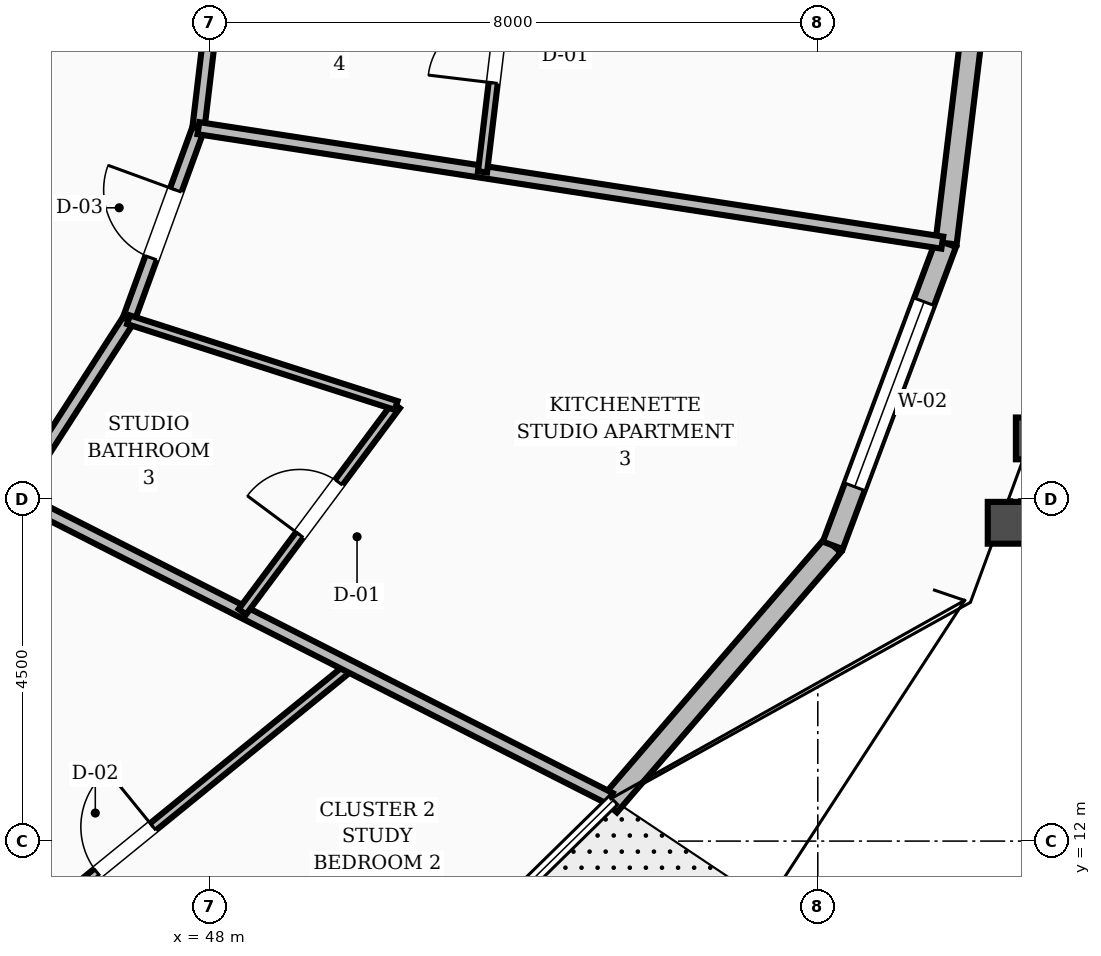
"""IFC4 building model, lengths in metres.
Left out: names, types, materials, properties, quantities, classifications, styles, units other than length and angle.
Written with IfcOpenShell. Run it as: python <this file> out.ifc"""

import sys

from ifc_helpers import new_model, si_unit, direction, frame, frame_2d, origin, place, context, subcontext, project, spatial, rectangle, extrude, element, fill, save


model = new_model("IFC4")
c1 = context("Model", 3, precision=1e-05, world=origin(), true_north=direction((0.0, 1.0)))
c2 = subcontext(c1, "Body", "Model", "MODEL_VIEW")
j1 = project(units=[si_unit("LENGTHUNIT", "METRE"), si_unit("PLANEANGLEUNIT", "RADIAN")], contexts=[c1])
p1 = place(None, origin())
s1 = spatial("IfcSite", under=j1, at=p1, CompositionType="ELEMENT")
p2 = place(p1, origin())
s2 = spatial("IfcBuilding", under=s1, at=p2, CompositionType="ELEMENT")
p3 = place(p2, frame((0.0, 0.0, 44.8)))
s3 = spatial("IfcBuildingStorey", under=s2, at=p3, CompositionType="ELEMENT", Elevation=44.8)
p4 = place(p3, frame((53.251, 12.469, 0.0), z_axis=(0.0, 0.0, 1.0), x_axis=(0.652392900896, 0.757880929211, 0.0)))
e1 = element("IfcWall", 1, at=p4, inside=s3, PredefinedType="STANDARD", context=c2, shape_type="SweptSolid", body=[
    extrude(rectangle(XDim=4.515, YDim=0.28, at=frame_2d((2.258, 0.0))), origin(), (0.0, 0.0, 1.0), 2.65),
])
p5 = place(p3, frame((56.197, 15.891, 0.0), z_axis=(0.0, 0.0, 1.0), x_axis=(0.351066723894, 0.936350444745, 0.0)))
e2 = element("IfcWall", 2, at=p5, inside=s3, PredefinedType="STANDARD", context=c2, shape_type="SweptSolid", body=[
    extrude(rectangle(XDim=4.246, YDim=0.28, at=frame_2d((2.123, 0.0))), origin(), (0.0, 0.0, 1.0), 2.65),
])
p6 = place(p5, frame((0.823, 0.0, 0.8)))
e3 = element("IfcOpeningElement", 3, at=p6, cuts=e2, PredefinedType="OPENING", context=c2, shape_type="SweptSolid", body=[
    extrude(rectangle(XDim=2.6, YDim=1.65, at=frame_2d((1.3, 0.825))), frame((0.0, 0.15, 0.0), z_axis=(0.0, -1.0, 0.0), x_axis=(1.0, 0.0, 0.0)), (0.0, 0.0, 1.0), 0.3),
])
p7 = place(p3, frame((57.688, 19.866, 0.0), z_axis=(0.0, 0.0, 1.0), x_axis=(0.120881081027, 0.992666995648, 0.0)))
e4 = element("IfcWall", 4, at=p7, inside=s3, PredefinedType="STANDARD", context=c2, shape_type="SweptSolid", body=[
    extrude(rectangle(XDim=4.165, YDim=0.28, at=frame_2d((2.082, 0.0))), origin(), (0.0, 0.0, 1.0), 2.65),
])
p8 = place(p3, frame((45.438, 16.537, 0.0), z_axis=(0.0, 0.0, 1.0), x_axis=(0.540891657444, 0.841092274907, 0.0)))
e5 = element("IfcWall", 5, at=p8, inside=s3, PredefinedType="SOLIDWALL", context=c2, shape_type="SweptSolid", body=[
    extrude(rectangle(XDim=2.761, YDim=0.16, at=frame_2d((1.38, 0.0))), origin(), (0.0, 0.0, 1.0), 2.61),
])
p9 = place(p3, frame((46.932, 18.859, 0.0), z_axis=(0.0, 0.0, 1.0), x_axis=(0.342882618672, 0.939378257047, 0.0)))
e6 = element("IfcWall", 6, at=p9, inside=s3, PredefinedType="SOLIDWALL", context=c2, shape_type="SweptSolid", body=[
    extrude(rectangle(XDim=2.683, YDim=0.16, at=frame_2d((1.341, 0.0))), origin(), (0.0, 0.0, 1.0), 2.61),
])
p10 = place(p9, frame((0.866, 0.0, 0.0)))
e7 = element("IfcOpeningElement", 7, at=p10, cuts=e6, PredefinedType="OPENING", context=c2, shape_type="SweptSolid", body=[
    extrude(rectangle(XDim=0.95, YDim=2.1, at=frame_2d((0.475, 1.05))), frame((0.0, 0.09, 0.0), z_axis=(0.0, -1.0, 0.0), x_axis=(1.0, 0.0, 0.0)), (0.0, 0.0, 1.0), 0.18),
])
p11 = place(p3, frame((47.852, 21.379, 0.0), z_axis=(0.0, 0.0, 1.0), x_axis=(0.117667763342, 0.993053018459, 0.0)))
e8 = element("IfcWall", 8, at=p11, inside=s3, PredefinedType="SOLIDWALL", context=c2, shape_type="SweptSolid", body=[
    extrude(rectangle(XDim=2.639, YDim=0.16, at=frame_2d((1.32, 0.0))), origin(), (0.0, 0.0, 1.0), 2.61),
])
p12 = place(p3, frame((43.925, 9.479, 0.0), z_axis=(0.0, 0.0, 1.0), x_axis=(0.775688329038, 0.631116166957, 0.0)))
e9 = element("IfcWall", 9, at=p12, inside=s3, PredefinedType="PARTITIONING", context=c2, shape_type="SweptSolid", body=[
    extrude(rectangle(XDim=7.635, YDim=0.12, at=frame_2d((3.817, 0.0))), origin(), (0.0, 0.0, 1.0), 2.61),
])
p13 = place(p12, frame((3.342, 0.0, 0.0)))
e10 = element("IfcOpeningElement", 10, at=p13, cuts=e9, PredefinedType="OPENING", context=c2, shape_type="SweptSolid", body=[
    extrude(rectangle(XDim=0.95, YDim=2.1, at=frame_2d((0.475, 1.05))), frame((0.0, 0.07, 0.0), z_axis=(0.0, -1.0, 0.0), x_axis=(1.0, 0.0, 0.0)), (0.0, 0.0, 1.0), 0.14),
])
p14 = place(p3, frame((45.438, 16.537, 0.0), z_axis=(0.0, 0.0, 1.0), x_axis=(0.891601143044, -0.452821600327, 0.0)))
e11 = element("IfcWall", 11, at=p14, inside=s3, PredefinedType="SOLIDWALL", context=c2, shape_type="SweptSolid", body=[
    extrude(rectangle(XDim=8.78, YDim=0.16, at=frame_2d((4.39, 0.0))), origin(), (0.0, 0.0, 1.0), 2.61),
])
p15 = place(p3, frame((48.43, 15.017, 0.0), z_axis=(0.0, 0.0, 1.0), x_axis=(0.597596813452, 0.801796762623, 0.0)))
e12 = element("IfcWall", 12, at=p15, inside=s3, PredefinedType="PARTITIONING", context=c2, shape_type="SweptSolid", body=[
    extrude(rectangle(XDim=3.385, YDim=0.12, at=frame_2d((1.692, 0.0))), origin(), (0.0, 0.0, 1.0), 2.61),
])
p16 = place(p15, frame((1.262, 0.0, 0.0)))
e13 = element("IfcOpeningElement", 13, at=p16, cuts=e12, PredefinedType="OPENING", context=c2, shape_type="SweptSolid", body=[
    extrude(rectangle(XDim=0.86, YDim=2.1, at=frame_2d((0.43, 1.05))), frame((0.0, 0.07, 0.0), z_axis=(0.0, -1.0, 0.0), x_axis=(1.0, 0.0, 0.0)), (0.0, 0.0, 1.0), 0.14),
])
p17 = place(p3, frame((46.932, 18.859, 0.0), z_axis=(0.0, 0.0, 1.0), x_axis=(0.952329028564, -0.3050728132, 0.0)))
e14 = element("IfcWall", 14, at=p17, inside=s3, PredefinedType="PARTITIONING", context=c2, shape_type="SweptSolid", body=[
    extrude(rectangle(XDim=3.697, YDim=0.12, at=frame_2d((1.849, 0.0))), origin(), (0.0, 0.0, 1.0), 2.61),
])
p18 = place(p3, frame((47.852, 21.379, 0.0), z_axis=(0.0, 0.0, 1.0), x_axis=(0.988371982693, -0.152055331469, 0.0)))
e15 = element("IfcWall", 15, at=p18, inside=s3, PredefinedType="SOLIDWALL", context=c2, shape_type="SweptSolid", body=[
    extrude(rectangle(XDim=9.902, YDim=0.16, at=frame_2d((4.951, 0.0))), origin(), (0.0, 0.0, 1.0), 2.61),
])
p19 = place(p3, frame((51.589, 20.804, 0.0), z_axis=(0.0, 0.0, 1.0), x_axis=(0.119234947107, 0.992866067196, 0.0)))
e16 = element("IfcWall", 16, at=p19, inside=s3, PredefinedType="PARTITIONING", context=c2, shape_type="SweptSolid", body=[
    extrude(rectangle(XDim=3.219, YDim=0.12, at=frame_2d((1.609, 0.0))), origin(), (0.0, 0.0, 1.0), 2.61),
])
p20 = place(p19, frame((1.179, 0.0, 0.0)))
e17 = element("IfcOpeningElement", 17, at=p20, cuts=e16, PredefinedType="OPENING", context=c2, shape_type="SweptSolid", body=[
    extrude(rectangle(XDim=0.86, YDim=2.1, at=frame_2d((0.43, 1.05))), frame((0.0, 0.07, 0.0), z_axis=(0.0, -1.0, 0.0), x_axis=(1.0, 0.0, 0.0)), (0.0, 0.0, 1.0), 0.14),
])
p21 = place(p6, origin())
e18 = element("IfcWindow", 18, at=p21, inside=s3, PartitioningType="SINGLE_PANEL", PredefinedType="WINDOW", context=c2, shape_type="SweptSolid", body=[
    extrude(rectangle(XDim=2.6, YDim=1.65, at=frame_2d((1.3, 0.825))), frame((0.0, 0.03, 0.0), z_axis=(0.0, -1.0, 0.0), x_axis=(1.0, 0.0, 0.0)), (0.0, 0.0, 1.0), 0.06),
])
fill(e3, e18)
p22 = place(p13, origin())
e19 = element("IfcDoor", 19, at=p22, inside=s3, OperationType="SINGLE_SWING_RIGHT", PredefinedType="DOOR", context=c2, shape_type="SweptSolid", body=[
    extrude(rectangle(XDim=0.95, YDim=2.1, at=frame_2d((0.475, 1.05))), frame((0.0, 0.025, 0.0), z_axis=(0.0, -1.0, 0.0), x_axis=(1.0, 0.0, 0.0)), (0.0, 0.0, 1.0), 0.05),
])
fill(e10, e19)
p23 = place(p16, origin())
e20 = element("IfcDoor", 20, at=p23, inside=s3, OperationType="SINGLE_SWING_LEFT", PredefinedType="DOOR", context=c2, shape_type="SweptSolid", body=[
    extrude(rectangle(XDim=0.86, YDim=2.1, at=frame_2d((0.43, 1.05))), frame((0.0, 0.025, 0.0), z_axis=(0.0, -1.0, 0.0), x_axis=(1.0, 0.0, 0.0)), (0.0, 0.0, 1.0), 0.05),
])
fill(e13, e20)
p24 = place(p10, origin())
e21 = element("IfcDoor", 21, at=p24, inside=s3, OperationType="SINGLE_SWING_RIGHT", PredefinedType="DOOR", context=c2, shape_type="SweptSolid", body=[
    extrude(rectangle(XDim=0.95, YDim=2.1, at=frame_2d((0.475, 1.05))), frame((0.0, 0.025, 0.0), z_axis=(0.0, -1.0, 0.0), x_axis=(1.0, 0.0, 0.0)), (0.0, 0.0, 1.0), 0.05),
])
fill(e7, e21)
p25 = place(p20, origin())
e22 = element("IfcDoor", 22, at=p25, inside=s3, OperationType="SINGLE_SWING_LEFT", PredefinedType="DOOR", context=c2, shape_type="SweptSolid", body=[
    extrude(rectangle(XDim=0.86, YDim=2.1, at=frame_2d((0.43, 1.05))), frame((0.0, 0.025, 0.0), z_axis=(0.0, -1.0, 0.0), x_axis=(1.0, 0.0, 0.0)), (0.0, 0.0, 1.0), 0.05),
])
fill(e17, e22)
save(model, sys.argv[1])
